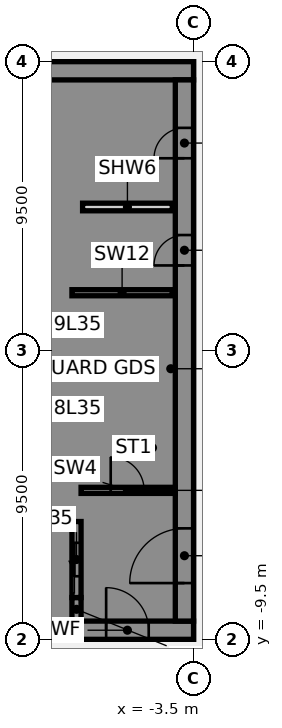
"""IFC4 building model, lengths in metres.
Left out: names, types, materials, properties, quantities, classifications, styles, units other than length and angle.
Written with IfcOpenShell. Run it as: python <this file> out.ifc"""

import sys

from ifc_helpers import new_model, si_unit, direction, frame, frame_2d, origin, place, context, subcontext, project, spatial, polyline, rectangle, outline, extrude, element, fill, save


model = new_model("IFC4")
c1 = context("Model", 3, precision=1e-05, world=origin(), true_north=direction((0.0, 1.0)))
c2 = subcontext(c1, "Body", "Model", "MODEL_VIEW")
j1 = project(units=[si_unit("LENGTHUNIT", "METRE"), si_unit("PLANEANGLEUNIT", "RADIAN")], contexts=[c1])
p1 = place(None, origin())
s1 = spatial("IfcSite", under=j1, at=p1, CompositionType="ELEMENT")
p2 = place(p1, origin())
s2 = spatial("IfcBuilding", under=s1, at=p2, CompositionType="ELEMENT")
p3 = place(p2, frame((0.0, 0.0, 144.25)))
s3 = spatial("IfcBuildingStorey", under=s2, at=p3, CompositionType="ELEMENT", Elevation=144.25)
p4 = place(p3, frame((-16.5, -9.2, 0.0), z_axis=(0.0, 0.0, 1.0), x_axis=(1.0, 0.0, 0.0)))
e1 = element("IfcWall", 1, at=p4, inside=s3, PredefinedType="SHEAR", context=c2, shape_type="SweptSolid", body=[
    extrude(rectangle(XDim=13.0, YDim=0.6, at=frame_2d((6.5, 0.0))), origin(), (0.0, 0.0, 1.0), 3.61),
])
p5 = place(p4, frame((4.15, 0.0, 0.0)))
e2 = element("IfcOpeningElement", 2, at=p5, cuts=e1, PredefinedType="OPENING", context=c2, shape_type="SweptSolid", body=[
    extrude(rectangle(XDim=1.4, YDim=2.1, at=frame_2d((0.7, 1.05))), frame((0.0, 0.31, 0.0), z_axis=(0.0, -1.0, 0.0), x_axis=(1.0, 0.0, 0.0)), (0.0, 0.0, 1.0), 0.62),
])
p6 = place(p4, frame((10.125, 0.0, 0.0)))
e3 = element("IfcOpeningElement", 3, at=p6, cuts=e1, PredefinedType="OPENING", context=c2, shape_type="SweptSolid", body=[
    extrude(rectangle(XDim=1.4, YDim=2.1, at=frame_2d((0.7, 1.05))), frame((0.0, 0.31, 0.0), z_axis=(0.0, -1.0, 0.0), x_axis=(1.0, 0.0, 0.0)), (0.0, 0.0, 1.0), 0.62),
])
p7 = place(p3, frame((-16.5, 9.2, 0.0), z_axis=(0.0, 0.0, 1.0), x_axis=(1.0, 0.0, 0.0)))
e4 = element("IfcWall", 4, at=p7, inside=s3, PredefinedType="SHEAR", context=c2, shape_type="SweptSolid", body=[
    extrude(rectangle(XDim=13.0, YDim=0.6, at=frame_2d((6.5, 0.0))), origin(), (0.0, 0.0, 1.0), 3.61),
])
p8 = place(p3, origin())
e5 = element("IfcWall", 5, at=p8, inside=s3, PredefinedType="SHEAR", context=c2, shape_type="SweptSolid", body=[
    extrude(outline(polyline([(-9.8, -5.375), (-9.8, -5.625), (-7.5, -5.625), (-7.2, -5.625), (-7.2, 8.9), (-7.5, 8.9), (-9.8, 8.9), (-9.8, 8.125), (-7.5, 8.125), (-7.5, 5.625), (-9.8, 5.625), (-9.8, 5.375), (-7.5, 5.375), (-7.5, 2.875), (-9.8, 2.875), (-9.8, 2.625), (-7.5, 2.625), (-7.5, 0.125), (-9.8, 0.125), (-9.8, -0.125), (-7.5, -0.125), (-7.5, -2.625), (-9.8, -2.625), (-9.8, -2.875), (-7.5, -2.875), (-7.5, -5.375), (-9.8, -5.375)])), origin(), (0.0, 0.0, 1.0), 3.61),
])
p9 = place(p3, origin())
e6 = element("IfcWall", 6, at=p9, inside=s3, PredefinedType="SHEAR", context=c2, shape_type="SweptSolid", body=[
    extrude(outline(polyline([(-7.5, -8.125), (-9.55, -8.125), (-9.55, -5.625), (-9.8, -5.625), (-9.8, -8.125), (-9.8, -8.9), (-7.5, -8.9), (-7.5, -8.125)])), origin(), (0.0, 0.0, 1.0), 3.61),
])
p10 = place(p3, frame((-7.35, -8.9, 0.0), z_axis=(0.0, 0.0, 1.0), x_axis=(0.0, 1.0, 0.0)))
e7 = element("IfcWall", 7, at=p10, inside=s3, PredefinedType="SHEAR", context=c2, shape_type="SweptSolid", body=[
    extrude(rectangle(XDim=0.775, YDim=0.3, at=frame_2d((0.387, 0.0))), origin(), (0.0, 0.0, 1.0), 3.61),
])
p11 = place(p3, frame((-7.5, 1.9, 0.0), z_axis=(0.0, 0.0, 1.0), x_axis=(1.0, 0.0, 0.0)))
e8 = element("IfcWall", 8, at=p11, inside=s3, PredefinedType="SHEAR", context=c2, shape_type="SweptSolid", body=[
    extrude(rectangle(XDim=3.3, YDim=0.2, at=frame_2d((1.65, 0.0))), origin(), (0.0, 0.0, 1.0), 3.61),
])
p12 = place(p3, frame((-7.35, -8.125, 0.0), z_axis=(0.0, 0.0, 1.0), x_axis=(0.0, 1.0, 0.0)))
e9 = element("IfcWall", 9, at=p12, inside=s3, PredefinedType="SHEAR", context=c2, shape_type="SweptSolid", body=[
    extrude(rectangle(XDim=2.5, YDim=0.3, at=frame_2d((1.25, 0.0))), origin(), (0.0, 0.0, 1.0), 3.61),
])
p13 = place(p12, frame((0.7, 0.0, 0.0)))
e10 = element("IfcOpeningElement", 10, at=p13, cuts=e9, PredefinedType="OPENING", context=c2, shape_type="SweptSolid", body=[
    extrude(rectangle(XDim=1.1, YDim=2.1, at=frame_2d((0.55, 1.05))), frame((0.0, 0.16, 0.0), z_axis=(0.0, -1.0, 0.0), x_axis=(1.0, 0.0, 0.0)), (0.0, 0.0, 1.0), 0.32),
])
p14 = place(p3, frame((-3.8, -8.9, 0.0), z_axis=(0.0, 0.0, 1.0), x_axis=(0.0, 1.0, 0.0)))
e11 = element("IfcWall", 11, at=p14, inside=s3, PredefinedType="SHEAR", context=c2, shape_type="SweptSolid", body=[
    extrude(rectangle(XDim=17.8, YDim=0.6, at=frame_2d((8.9, 0.0))), origin(), (0.0, 0.0, 1.0), 3.61),
])
p15 = place(p14, frame((1.25, 0.0, 0.0)))
e12 = element("IfcOpeningElement", 12, at=p15, cuts=e11, PredefinedType="OPENING", context=c2, shape_type="SweptSolid", body=[
    extrude(rectangle(XDim=1.8, YDim=2.1, at=frame_2d((0.9, 1.05))), frame((0.0, 0.31, 0.0), z_axis=(0.0, -1.0, 0.0), x_axis=(1.0, 0.0, 0.0)), (0.0, 0.0, 1.0), 0.62),
])
p16 = place(p14, frame((11.698, 0.0, 0.0)))
e13 = element("IfcOpeningElement", 13, at=p16, cuts=e11, PredefinedType="OPENING", context=c2, shape_type="SweptSolid", body=[
    extrude(rectangle(XDim=1.0, YDim=2.1, at=frame_2d((0.5, 1.05))), frame((0.0, 0.31, 0.0), z_axis=(0.0, -1.0, 0.0), x_axis=(1.0, 0.0, 0.0)), (0.0, 0.0, 1.0), 0.62),
])
p17 = place(p14, frame((15.222, 0.0, 0.0)))
e14 = element("IfcOpeningElement", 14, at=p17, cuts=e11, PredefinedType="OPENING", context=c2, shape_type="SweptSolid", body=[
    extrude(rectangle(XDim=1.0, YDim=2.1, at=frame_2d((0.5, 1.05))), frame((0.0, 0.31, 0.0), z_axis=(0.0, -1.0, 0.0), x_axis=(1.0, 0.0, 0.0)), (0.0, 0.0, 1.0), 0.62),
])
p18 = place(p3, frame((-7.15, 4.72, 0.0), z_axis=(0.0, 0.0, 1.0), x_axis=(1.0, 0.0, 0.0)))
e15 = element("IfcWall", 15, at=p18, inside=s3, PredefinedType="PARTITIONING", context=c2, shape_type="SweptSolid", body=[
    extrude(rectangle(XDim=2.95, YDim=0.25, at=frame_2d((1.475, 0.0))), origin(), (0.0, 0.0, 1.0), 3.61),
])
p19 = place(p3, frame((-7.2, -4.6, 0.0), z_axis=(0.0, 0.0, 1.0), x_axis=(1.0, 0.0, 0.0)))
e16 = element("IfcWall", 16, at=p19, inside=s3, PredefinedType="SHEAR", context=c2, shape_type="SweptSolid", body=[
    extrude(rectangle(XDim=3.1, YDim=0.2, at=frame_2d((1.55, 0.0))), origin(), (0.0, 0.0, 1.0), 3.61),
])
p20 = place(p19, frame((0.975, 0.0, 0.0)))
e17 = element("IfcOpeningElement", 17, at=p20, cuts=e16, PredefinedType="OPENING", context=c2, shape_type="SweptSolid", body=[
    extrude(rectangle(XDim=1.1, YDim=2.1, at=frame_2d((0.55, 1.05))), frame((0.0, 0.11, 0.0), z_axis=(0.0, -1.0, 0.0), x_axis=(1.0, 0.0, 0.0)), (0.0, 0.0, 1.0), 0.22),
])
p21 = place(p6, origin())
e18 = element("IfcDoor", 18, at=p21, inside=s3, OperationType="SINGLE_SWING_LEFT", PredefinedType="DOOR", context=c2, shape_type="SweptSolid", body=[
    extrude(rectangle(XDim=1.4, YDim=2.1, at=frame_2d((0.7, 1.05))), frame((0.0, 0.025, 0.0), z_axis=(0.0, -1.0, 0.0), x_axis=(1.0, 0.0, 0.0)), (0.0, 0.0, 1.0), 0.05),
])
fill(e3, e18)
p22 = place(p15, origin())
e19 = element("IfcDoor", 19, at=p22, inside=s3, OperationType="SINGLE_SWING_LEFT", PredefinedType="DOOR", context=c2, shape_type="SweptSolid", body=[
    extrude(rectangle(XDim=1.8, YDim=2.1, at=frame_2d((0.9, 1.05))), frame((0.0, 0.025, 0.0), z_axis=(0.0, -1.0, 0.0), x_axis=(1.0, 0.0, 0.0)), (0.0, 0.0, 1.0), 0.05),
])
fill(e12, e19)
p23 = place(p16, origin())
e20 = element("IfcDoor", 20, at=p23, inside=s3, OperationType="SINGLE_SWING_LEFT", PredefinedType="DOOR", context=c2, shape_type="SweptSolid", body=[
    extrude(rectangle(XDim=1.0, YDim=2.1, at=frame_2d((0.5, 1.05))), frame((0.0, 0.275, 0.0), z_axis=(0.0, -1.0, 0.0), x_axis=(1.0, 0.0, 0.0)), (0.0, 0.0, 1.0), 0.05),
])
fill(e13, e20)
p24 = place(p17, origin())
e21 = element("IfcDoor", 21, at=p24, inside=s3, OperationType="SINGLE_SWING_LEFT", PredefinedType="DOOR", context=c2, shape_type="SweptSolid", body=[
    extrude(rectangle(XDim=1.0, YDim=2.1, at=frame_2d((0.5, 1.05))), frame((0.0, 0.275, 0.0), z_axis=(0.0, -1.0, 0.0), x_axis=(1.0, 0.0, 0.0)), (0.0, 0.0, 1.0), 0.05),
])
fill(e14, e21)
p25 = place(p20, origin())
e22 = element("IfcDoor", 22, at=p25, inside=s3, OperationType="SINGLE_SWING_LEFT", PredefinedType="DOOR", context=c2, shape_type="SweptSolid", body=[
    extrude(rectangle(XDim=1.1, YDim=2.1, at=frame_2d((0.55, 1.05))), frame((0.0, 0.025, 0.0), z_axis=(0.0, -1.0, 0.0), x_axis=(1.0, 0.0, 0.0)), (0.0, 0.0, 1.0), 0.05),
])
fill(e17, e22)
p26 = place(p13, origin())
e23 = element("IfcDoor", 23, at=p26, inside=s3, OperationType="SLIDING_TO_LEFT", PredefinedType="DOOR", context=c2, shape_type="SweptSolid", body=[
    extrude(rectangle(XDim=1.1, YDim=2.1, at=frame_2d((0.55, 1.05))), frame((0.0, 0.025, 0.0), z_axis=(0.0, -1.0, 0.0), x_axis=(1.0, 0.0, 0.0)), (0.0, 0.0, 1.0), 0.05),
])
fill(e10, e23)
save(model, sys.argv[1])
